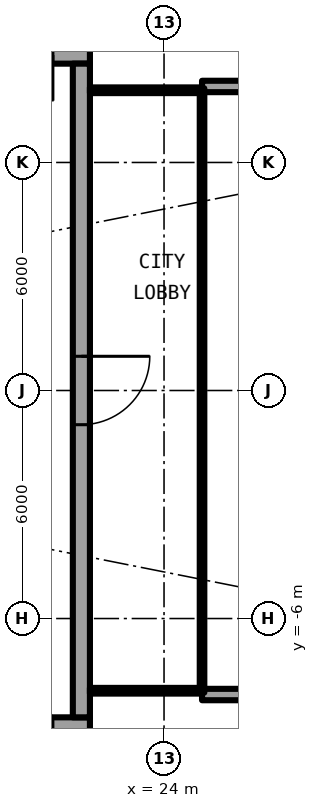
"""IFC4 building model, lengths in metres.
Left out: names, types, materials, properties, quantities, classifications, styles, units other than length and angle.
Written with IfcOpenShell. Run it as: python <this file> out.ifc"""

import sys

from ifc_helpers import new_model, si_unit, direction, frame, frame_2d, origin, place, context, subcontext, project, spatial, rectangle, extrude, element, fill, save


model = new_model("IFC4")
c1 = context("Model", 3, precision=1e-05, world=origin(), true_north=direction((0.0, 1.0)))
c2 = subcontext(c1, "Body", "Model", "MODEL_VIEW")
j1 = project(units=[si_unit("LENGTHUNIT", "METRE"), si_unit("PLANEANGLEUNIT", "RADIAN")], contexts=[c1])
p1 = place(None, origin())
s1 = spatial("IfcSite", under=j1, at=p1, CompositionType="ELEMENT")
p2 = place(p1, origin())
s2 = spatial("IfcBuilding", under=s1, at=p2, CompositionType="ELEMENT")
p3 = place(p2, frame((0.0, 0.0, 190.2)))
s3 = spatial("IfcBuildingStorey", under=s2, at=p3, CompositionType="ELEMENT", Elevation=190.2)
for number, where, z_axis, x_axis in (
    (1, (25.0, 8.0, 0.0), (0.0, 0.0, 1.0), (1.0, 0.0, 0.0)),
    (2, (25.0, -8.0, 0.0), (0.0, 0.0, 1.0), (1.0, 0.0, 0.0)),
):
    element("IfcWall", number, at=place(p3, frame(where, z_axis=z_axis, x_axis=x_axis)), inside=s3, PredefinedType="SOLIDWALL", context=c2, shape_type="SweptSolid", body=[
        extrude(rectangle(XDim=2.667, YDim=0.3, at=frame_2d((1.333, 0.0))), origin(), (0.0, 0.0, 1.0), 2.7),
    ])
p4 = place(p3, frame((22.05, 8.825, 0.0), z_axis=(0.0, 0.0, 1.0), x_axis=(-1.0, 0.0, 0.0)))
e3 = element("IfcWall", 3, at=p4, inside=s3, PredefinedType="SHEAR", context=c2, shape_type="SweptSolid", body=[
    extrude(rectangle(XDim=13.5, YDim=0.45, at=frame_2d((6.75, 0.0))), origin(), (0.0, 0.0, 1.0), 3.05),
])
p5 = place(p4, frame((0.975, 0.0, 0.0)))
e4 = element("IfcOpeningElement", 4, at=p5, cuts=e3, PredefinedType="OPENING", context=c2, shape_type="SweptSolid", body=[
    extrude(rectangle(XDim=1.2, YDim=2.3, at=frame_2d((0.6, 1.15))), frame((0.0, 0.235, 0.0), z_axis=(0.0, -1.0, 0.0), x_axis=(1.0, 0.0, 0.0)), (0.0, 0.0, 1.0), 0.47),
])
p6 = place(p3, frame((8.55, -8.825, 0.0), z_axis=(0.0, 0.0, 1.0), x_axis=(1.0, 0.0, 0.0)))
e5 = element("IfcWall", 5, at=p6, inside=s3, PredefinedType="SHEAR", context=c2, shape_type="SweptSolid", body=[
    extrude(rectangle(XDim=13.5, YDim=0.45, at=frame_2d((6.75, 0.0))), origin(), (0.0, 0.0, 1.0), 3.05),
])
p7 = place(p6, frame((11.325, 0.0, 0.0)))
e6 = element("IfcOpeningElement", 6, at=p7, cuts=e5, PredefinedType="OPENING", context=c2, shape_type="SweptSolid", body=[
    extrude(rectangle(XDim=1.2, YDim=2.3, at=frame_2d((0.6, 1.15))), frame((0.0, 0.235, 0.0), z_axis=(0.0, -1.0, 0.0), x_axis=(1.0, 0.0, 0.0)), (0.0, 0.0, 1.0), 0.47),
])
p8 = place(p3, frame((21.825, 8.6, 0.0), z_axis=(0.0, 0.0, 1.0), x_axis=(0.0, -1.0, 0.0)))
e7 = element("IfcWall", 7, at=p8, inside=s3, PredefinedType="SHEAR", context=c2, shape_type="SweptSolid", body=[
    extrude(rectangle(XDim=17.2, YDim=0.45, at=frame_2d((8.6, 0.0))), origin(), (0.0, 0.0, 1.0), 3.05),
])
p9 = place(p8, frame((7.7, 0.0, 0.0)))
e8 = element("IfcOpeningElement", 8, at=p9, cuts=e7, PredefinedType="OPENING", context=c2, shape_type="SweptSolid", body=[
    extrude(rectangle(XDim=1.8, YDim=2.3, at=frame_2d((0.9, 1.15))), frame((0.0, 0.235, 0.0), z_axis=(0.0, -1.0, 0.0), x_axis=(1.0, 0.0, 0.0)), (0.0, 0.0, 1.0), 0.47),
])
for number, where, z_axis, x_axis in (
    (9, (22.05, -7.9, 0.0), (0.0, 0.0, 1.0), (1.0, 0.0, 0.0)),
    (10, (22.05, 7.9, 0.0), (0.0, 0.0, 1.0), (1.0, 0.0, 0.0)),
):
    element("IfcWall", number, at=place(p3, frame(where, z_axis=z_axis, x_axis=x_axis)), inside=s3, PredefinedType="PARTITIONING", context=c2, shape_type="SweptSolid", body=[
        extrude(rectangle(XDim=2.89, YDim=0.15, at=frame_2d((1.445, 0.0))), origin(), (0.0, 0.0, 1.0), 2.7),
    ])
p10 = place(p3, frame((25.0, -7.95, 0.0), z_axis=(0.0, 0.0, 1.0), x_axis=(0.0, 1.0, 0.0)))
e11 = element("IfcWall", 11, at=p10, inside=s3, PredefinedType="PARTITIONING", context=c2, shape_type="SweptSolid", body=[
    extrude(rectangle(XDim=15.9, YDim=0.12, at=frame_2d((7.95, 0.0))), origin(), (0.0, 0.0, 1.0), 2.7),
])
p11 = place(p10, frame((0.95, 0.0, 0.1)))
e12 = element("IfcOpeningElement", 12, at=p11, cuts=e11, PredefinedType="OPENING", context=c2, shape_type="SweptSolid", body=[
    extrude(rectangle(XDim=14.0, YDim=2.35, at=frame_2d((7.0, 1.175))), frame((0.0, 0.07, 0.0), z_axis=(0.0, -1.0, 0.0), x_axis=(1.0, 0.0, 0.0)), (0.0, 0.0, 1.0), 0.14),
])
p12 = place(p5, origin())
e13 = element("IfcDoor", 13, at=p12, inside=s3, OperationType="SINGLE_SWING_RIGHT", PredefinedType="DOOR", context=c2, shape_type="SweptSolid", body=[
    extrude(rectangle(XDim=1.2, YDim=2.3, at=frame_2d((0.6, 1.15))), frame((0.0, 0.025, 0.0), z_axis=(0.0, -1.0, 0.0), x_axis=(1.0, 0.0, 0.0)), (0.0, 0.0, 1.0), 0.05),
])
fill(e4, e13)
p13 = place(p7, origin())
e14 = element("IfcDoor", 14, at=p13, inside=s3, OperationType="SINGLE_SWING_LEFT", PredefinedType="DOOR", context=c2, shape_type="SweptSolid", body=[
    extrude(rectangle(XDim=1.2, YDim=2.3, at=frame_2d((0.6, 1.15))), frame((0.0, 0.025, 0.0), z_axis=(0.0, -1.0, 0.0), x_axis=(1.0, 0.0, 0.0)), (0.0, 0.0, 1.0), 0.05),
])
fill(e6, e14)
p14 = place(p9, origin())
e15 = element("IfcDoor", 15, at=p14, inside=s3, OperationType="SINGLE_SWING_LEFT", PredefinedType="DOOR", context=c2, shape_type="SweptSolid", body=[
    extrude(rectangle(XDim=1.8, YDim=2.3, at=frame_2d((0.9, 1.15))), frame((0.0, 0.025, 0.0), z_axis=(0.0, -1.0, 0.0), x_axis=(1.0, 0.0, 0.0)), (0.0, 0.0, 1.0), 0.05),
])
fill(e8, e15)
p15 = place(p11, origin())
e16 = element("IfcWindow", 16, at=p15, inside=s3, PartitioningType="SINGLE_PANEL", PredefinedType="WINDOW", context=c2, shape_type="SweptSolid", body=[
    extrude(rectangle(XDim=14.0, YDim=2.35, at=frame_2d((7.0, 1.175))), frame((0.0, 0.03, 0.0), z_axis=(0.0, -1.0, 0.0), x_axis=(1.0, 0.0, 0.0)), (0.0, 0.0, 1.0), 0.06),
])
fill(e12, e16)
save(model, sys.argv[1])
